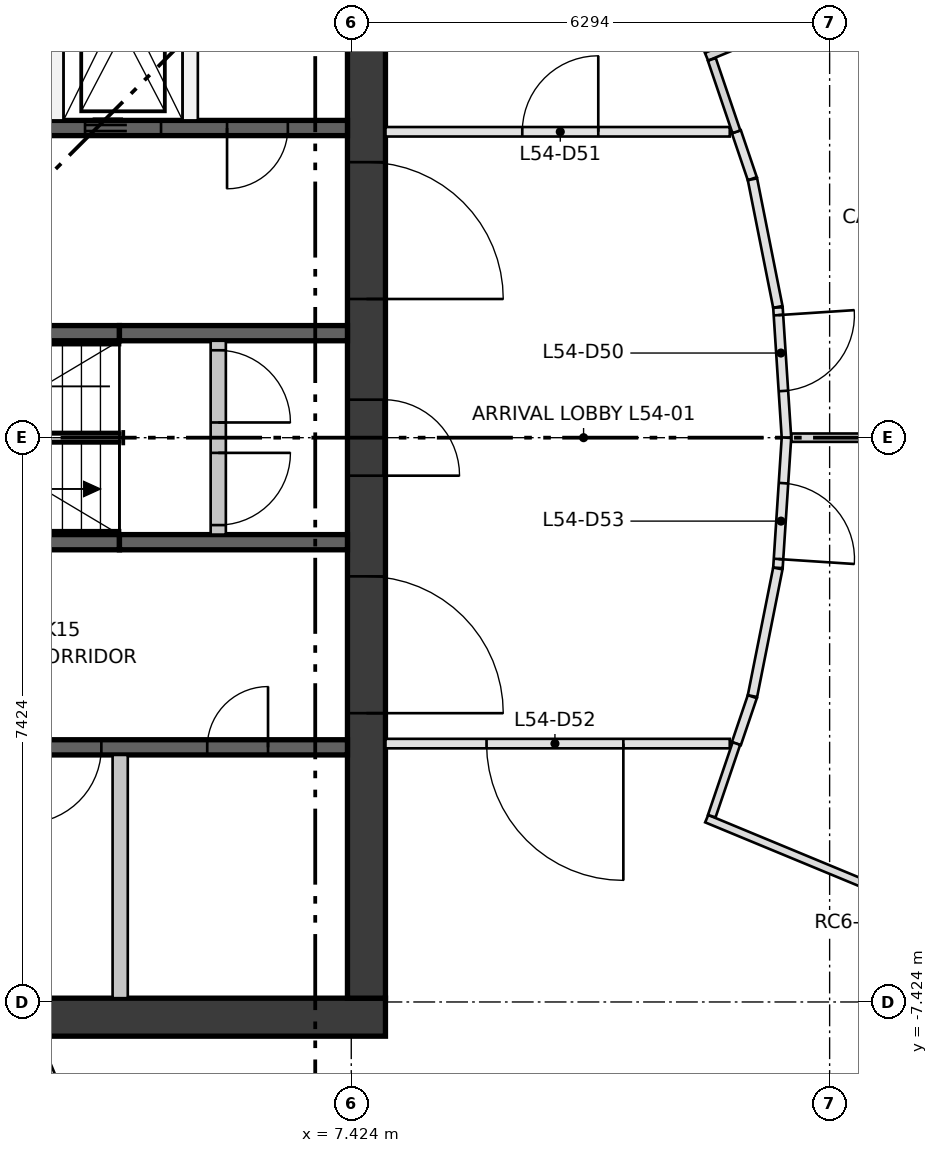
"""IFC4 building model, lengths in metres.
Left out: names, types, materials, properties, quantities, classifications, styles, units other than length and angle.
Written with IfcOpenShell. Run it as: python <this file> out.ifc"""

import sys

from ifc_helpers import new_model, si_unit, direction, frame, frame_2d, origin, place, context, subcontext, project, spatial, rectangle, extrude, element, fill, save


model = new_model("IFC4")
c1 = context("Model", 3, precision=1e-05, world=origin(), true_north=direction((0.0, 1.0)))
c2 = subcontext(c1, "Body", "Model", "MODEL_VIEW")
j1 = project(units=[si_unit("LENGTHUNIT", "METRE"), si_unit("PLANEANGLEUNIT", "RADIAN")], contexts=[c1])
p1 = place(None, origin())
s1 = spatial("IfcSite", under=j1, at=p1, CompositionType="ELEMENT")
p2 = place(p1, origin())
s2 = spatial("IfcBuilding", under=s1, at=p2, CompositionType="ELEMENT")
p3 = place(p2, frame((0.0, 0.0, 201.05)))
s3 = spatial("IfcBuildingStorey", under=s2, at=p3, CompositionType="ELEMENT", Elevation=201.05)
p4 = place(p3, frame((-7.874, -7.624, 0.0), z_axis=(0.0, 0.0, 1.0), x_axis=(1.0, 0.0, 0.0)))
e1 = element("IfcWall", 1, at=p4, inside=s3, PredefinedType="SHEAR", context=c2, shape_type="SweptSolid", body=[
    extrude(rectangle(XDim=15.748, YDim=0.5, at=frame_2d((7.874, 0.0))), origin(), (0.0, 0.0, 1.0), 3.35),
])
p5 = place(p3, frame((7.624, -7.374, 0.0), z_axis=(0.0, 0.0, 1.0), x_axis=(0.0, 1.0, 0.0)))
e2 = element("IfcWall", 2, at=p5, inside=s3, PredefinedType="SHEAR", context=c2, shape_type="SweptSolid", body=[
    extrude(rectangle(XDim=14.748, YDim=0.5, at=frame_2d((7.374, 0.0))), origin(), (0.0, 0.0, 1.0), 3.35),
])
p6 = place(p5, frame((6.874, 0.0, 0.0)))
e3 = element("IfcOpeningElement", 3, at=p6, cuts=e2, PredefinedType="OPENING", context=c2, shape_type="SweptSolid", body=[
    extrude(rectangle(XDim=1.0, YDim=2.1, at=frame_2d((0.5, 1.05))), frame((0.0, 0.26, 0.0), z_axis=(0.0, -1.0, 0.0), x_axis=(1.0, 0.0, 0.0)), (0.0, 0.0, 1.0), 0.52),
])
p7 = place(p5, frame((3.75, 0.0, 0.0)))
e4 = element("IfcOpeningElement", 4, at=p7, cuts=e2, PredefinedType="OPENING", context=c2, shape_type="SweptSolid", body=[
    extrude(rectangle(XDim=1.8, YDim=2.1, at=frame_2d((0.9, 1.05))), frame((0.0, 0.26, 0.0), z_axis=(0.0, -1.0, 0.0), x_axis=(1.0, 0.0, 0.0)), (0.0, 0.0, 1.0), 0.52),
])
p8 = place(p5, frame((9.198, 0.0, 0.0)))
e5 = element("IfcOpeningElement", 5, at=p8, cuts=e2, PredefinedType="OPENING", context=c2, shape_type="SweptSolid", body=[
    extrude(rectangle(XDim=1.8, YDim=2.1, at=frame_2d((0.9, 1.05))), frame((0.0, 0.26, 0.0), z_axis=(0.0, -1.0, 0.0), x_axis=(1.0, 0.0, 0.0)), (0.0, 0.0, 1.0), 0.52),
])
p9 = place(p3, frame((-7.374, -4.074, 0.0), z_axis=(0.0, 0.0, 1.0), x_axis=(1.0, 0.0, 0.0)))
e6 = element("IfcWall", 6, at=p9, inside=s3, PredefinedType="SHEAR", context=c2, shape_type="SweptSolid", body=[
    extrude(rectangle(XDim=14.748, YDim=0.2, at=frame_2d((7.374, 0.0))), origin(), (0.0, 0.0, 1.0), 3.0),
])
p10 = place(p9, frame((1.319, 0.0, 0.0)))
e7 = element("IfcOpeningElement", 7, at=p10, cuts=e6, PredefinedType="OPENING", context=c2, shape_type="SweptSolid", body=[
    extrude(rectangle(XDim=1.1, YDim=2.1, at=frame_2d((0.55, 1.05))), frame((0.0, 0.11, 0.0), z_axis=(0.0, -1.0, 0.0), x_axis=(1.0, 0.0, 0.0)), (0.0, 0.0, 1.0), 0.22),
])
p11 = place(p9, frame((4.456, 0.0, 0.0)))
e8 = element("IfcOpeningElement", 8, at=p11, cuts=e6, PredefinedType="OPENING", context=c2, shape_type="SweptSolid", body=[
    extrude(rectangle(XDim=1.1, YDim=2.1, at=frame_2d((0.55, 1.05))), frame((0.0, 0.11, 0.0), z_axis=(0.0, -1.0, 0.0), x_axis=(1.0, 0.0, 0.0)), (0.0, 0.0, 1.0), 0.22),
])
p12 = place(p9, frame((7.918, 0.0, 0.0)))
e9 = element("IfcOpeningElement", 9, at=p12, cuts=e6, PredefinedType="OPENING", context=c2, shape_type="SweptSolid", body=[
    extrude(rectangle(XDim=1.0, YDim=2.1, at=frame_2d((0.5, 1.05))), frame((0.0, 0.11, 0.0), z_axis=(0.0, -1.0, 0.0), x_axis=(1.0, 0.0, 0.0)), (0.0, 0.0, 1.0), 0.22),
])
p13 = place(p9, frame((10.51, 0.0, 0.0)))
e10 = element("IfcOpeningElement", 10, at=p13, cuts=e6, PredefinedType="OPENING", context=c2, shape_type="SweptSolid", body=[
    extrude(rectangle(XDim=1.0, YDim=2.1, at=frame_2d((0.5, 1.05))), frame((0.0, 0.11, 0.0), z_axis=(0.0, -1.0, 0.0), x_axis=(1.0, 0.0, 0.0)), (0.0, 0.0, 1.0), 0.22),
])
p14 = place(p9, frame((12.903, 0.0, 0.0)))
e11 = element("IfcOpeningElement", 11, at=p14, cuts=e6, PredefinedType="OPENING", context=c2, shape_type="SweptSolid", body=[
    extrude(rectangle(XDim=0.8, YDim=2.1, at=frame_2d((0.4, 1.05))), frame((0.0, 0.11, 0.0), z_axis=(0.0, -1.0, 0.0), x_axis=(1.0, 0.0, 0.0)), (0.0, 0.0, 1.0), 0.22),
])
p15 = place(p3, frame((0.0, 4.074, 0.0), z_axis=(0.0, 0.0, 1.0), x_axis=(1.0, 0.0, 0.0)))
e12 = element("IfcWall", 12, at=p15, inside=s3, PredefinedType="SHEAR", context=c2, shape_type="SweptSolid", body=[
    extrude(rectangle(XDim=7.374, YDim=0.2, at=frame_2d((3.687, 0.0))), origin(), (0.0, 0.0, 1.0), 3.0),
])
p16 = place(p15, frame((0.384, 0.0, 0.0)))
e13 = element("IfcOpeningElement", 13, at=p16, cuts=e12, PredefinedType="OPENING", context=c2, shape_type="SweptSolid", body=[
    extrude(rectangle(XDim=1.0, YDim=2.1, at=frame_2d((0.5, 1.05))), frame((0.0, 0.11, 0.0), z_axis=(0.0, -1.0, 0.0), x_axis=(1.0, 0.0, 0.0)), (0.0, 0.0, 1.0), 0.22),
])
p17 = place(p15, frame((2.153, 0.0, 0.0)))
e14 = element("IfcOpeningElement", 14, at=p17, cuts=e12, PredefinedType="OPENING", context=c2, shape_type="SweptSolid", body=[
    extrude(rectangle(XDim=1.0, YDim=2.1, at=frame_2d((0.5, 1.05))), frame((0.0, 0.11, 0.0), z_axis=(0.0, -1.0, 0.0), x_axis=(1.0, 0.0, 0.0)), (0.0, 0.0, 1.0), 0.22),
])
p18 = place(p15, frame((3.921, 0.0, 0.0)))
e15 = element("IfcOpeningElement", 15, at=p18, cuts=e12, PredefinedType="OPENING", context=c2, shape_type="SweptSolid", body=[
    extrude(rectangle(XDim=1.0, YDim=2.1, at=frame_2d((0.5, 1.05))), frame((0.0, 0.11, 0.0), z_axis=(0.0, -1.0, 0.0), x_axis=(1.0, 0.0, 0.0)), (0.0, 0.0, 1.0), 0.22),
])
p19 = place(p15, frame((5.79, 0.0, 0.0)))
e16 = element("IfcOpeningElement", 16, at=p19, cuts=e12, PredefinedType="OPENING", context=c2, shape_type="SweptSolid", body=[
    extrude(rectangle(XDim=0.8, YDim=2.1, at=frame_2d((0.4, 1.05))), frame((0.0, 0.11, 0.0), z_axis=(0.0, -1.0, 0.0), x_axis=(1.0, 0.0, 0.0)), (0.0, 0.0, 1.0), 0.22),
])
p20 = place(p3, frame((0.0, -1.375, 0.0), z_axis=(0.0, 0.0, 1.0), x_axis=(1.0, 0.0, 0.0)))
e17 = element("IfcWall", 17, at=p20, inside=s3, PredefinedType="SHEAR", context=c2, shape_type="SweptSolid", body=[
    extrude(rectangle(XDim=4.374, YDim=0.2, at=frame_2d((2.187, 0.0))), origin(), (0.0, 0.0, 1.0), 3.0),
])
p21 = place(p3, frame((4.374, -1.375, 0.0), z_axis=(0.0, 0.0, 1.0), x_axis=(1.0, 0.0, 0.0)))
e18 = element("IfcWall", 18, at=p21, inside=s3, PredefinedType="SHEAR", context=c2, shape_type="SweptSolid", body=[
    extrude(rectangle(XDim=3.0, YDim=0.2, at=frame_2d((1.5, 0.0))), origin(), (0.0, 0.0, 1.0), 3.0),
])
p22 = place(p3, frame((0.0, 1.375, 0.0), z_axis=(0.0, 0.0, 1.0), x_axis=(1.0, 0.0, 0.0)))
e19 = element("IfcWall", 19, at=p22, inside=s3, PredefinedType="SHEAR", context=c2, shape_type="SweptSolid", body=[
    extrude(rectangle(XDim=4.374, YDim=0.2, at=frame_2d((2.187, 0.0))), origin(), (0.0, 0.0, 1.0), 3.0),
])
p23 = place(p3, frame((4.374, 1.375, 0.0), z_axis=(0.0, 0.0, 1.0), x_axis=(1.0, 0.0, 0.0)))
e20 = element("IfcWall", 20, at=p23, inside=s3, PredefinedType="SHEAR", context=c2, shape_type="SweptSolid", body=[
    extrude(rectangle(XDim=3.0, YDim=0.2, at=frame_2d((1.5, 0.0))), origin(), (0.0, 0.0, 1.0), 3.0),
])
for number, where, z_axis, x_axis in (
    (21, (4.384, -7.374, 0.0), (0.0, 0.0, 1.0), (0.0, 1.0, 0.0)),
    (22, (3.537, 4.174, 0.0), (0.0, 0.0, 1.0), (0.0, 1.0, 0.0)),
    (23, (5.305, 4.174, 0.0), (0.0, 0.0, 1.0), (0.0, 1.0, 0.0)),
):
    element("IfcWall", number, at=place(p3, frame(where, z_axis=z_axis, x_axis=x_axis)), inside=s3, PredefinedType="PARTITIONING", context=c2, shape_type="SweptSolid", body=[
        extrude(rectangle(XDim=3.2, YDim=0.2, at=frame_2d((1.6, 0.0))), origin(), (0.0, 0.0, 1.0), 3.0),
    ])
p24 = place(p3, frame((5.674, -1.275, 0.0), z_axis=(0.0, 0.0, 1.0), x_axis=(0.0, 1.0, 0.0)))
e24 = element("IfcWall", 24, at=p24, inside=s3, PredefinedType="PARTITIONING", context=c2, shape_type="SweptSolid", body=[
    extrude(rectangle(XDim=2.55, YDim=0.2, at=frame_2d((1.275, 0.0))), origin(), (0.0, 0.0, 1.0), 3.0),
])
p25 = place(p24, frame((0.125, 0.0, 0.0)))
e25 = element("IfcOpeningElement", 25, at=p25, cuts=e24, PredefinedType="OPENING", context=c2, shape_type="SweptSolid", body=[
    extrude(rectangle(XDim=0.95, YDim=2.1, at=frame_2d((0.475, 1.05))), frame((0.0, 0.11, 0.0), z_axis=(0.0, -1.0, 0.0), x_axis=(1.0, 0.0, 0.0)), (0.0, 0.0, 1.0), 0.22),
])
p26 = place(p24, frame((1.475, 0.0, 0.0)))
e26 = element("IfcOpeningElement", 26, at=p26, cuts=e24, PredefinedType="OPENING", context=c2, shape_type="SweptSolid", body=[
    extrude(rectangle(XDim=0.95, YDim=2.1, at=frame_2d((0.475, 1.05))), frame((0.0, 0.11, 0.0), z_axis=(0.0, -1.0, 0.0), x_axis=(1.0, 0.0, 0.0)), (0.0, 0.0, 1.0), 0.22),
])
p27 = place(p3, frame((14.142, -9.431, 0.0), z_axis=(0.0, 0.0, 1.0), x_axis=(0.471441594872, 0.881897285756, 0.0)))
e27 = element("IfcWall", 27, at=p27, inside=s3, PredefinedType="SOLIDWALL", context=c2, shape_type="SweptSolid", body=[
    extrude(rectangle(XDim=2.85, YDim=0.3, at=frame_2d((1.425, 0.0))), origin(), (0.0, 0.0, 1.0), 0.9),
])
p28 = place(p3, frame((12.491, 4.024, 0.0), z_axis=(0.0, 0.0, 1.0), x_axis=(0.321506357846, -0.946907419902, 0.0)))
e28 = element("IfcWall", 28, at=p28, inside=s3, PredefinedType="PARTITIONING", context=c2, shape_type="SweptSolid", body=[
    extrude(rectangle(XDim=0.652, YDim=0.125, at=frame_2d((0.326, 0.0))), origin(), (0.0, 0.0, 1.0), 3.0),
])
p29 = place(p3, frame((12.703, 3.399, 0.0), z_axis=(0.0, 0.0, 1.0), x_axis=(0.195101249107, -0.980783106806, 0.0)))
e29 = element("IfcWall", 29, at=p29, inside=s3, PredefinedType="PARTITIONING", context=c2, shape_type="SweptSolid", body=[
    extrude(rectangle(XDim=1.712, YDim=0.125, at=frame_2d((0.856, 0.0))), origin(), (0.0, 0.0, 1.0), 3.0),
])
p30 = place(p3, frame((13.038, 1.712, 0.0), z_axis=(0.0, 0.0, 1.0), x_axis=(0.065300872496, -0.997865620237, 0.0)))
e30 = element("IfcWall", 30, at=p30, inside=s3, PredefinedType="PARTITIONING", context=c2, shape_type="SweptSolid", body=[
    extrude(rectangle(XDim=1.716, YDim=0.125, at=frame_2d((0.858, 0.0))), origin(), (0.0, 0.0, 1.0), 3.0),
])
p31 = place(p30, frame((0.1, 0.0, 0.0)))
e31 = element("IfcOpeningElement", 31, at=p31, cuts=e30, PredefinedType="OPENING", context=c2, shape_type="SweptSolid", body=[
    extrude(rectangle(XDim=1.0, YDim=2.1, at=frame_2d((0.5, 1.05))), frame((0.0, 0.073, 0.0), z_axis=(0.0, -1.0, 0.0), x_axis=(1.0, 0.0, 0.0)), (0.0, 0.0, 1.0), 0.145),
])
p32 = place(p3, frame((7.874, 4.024, 0.0), z_axis=(0.0, 0.0, 1.0), x_axis=(1.0, 0.0, 0.0)))
e32 = element("IfcWall", 32, at=p32, inside=s3, PredefinedType="PARTITIONING", context=c2, shape_type="SweptSolid", body=[
    extrude(rectangle(XDim=4.53, YDim=0.125, at=frame_2d((2.265, 0.0))), origin(), (0.0, 0.0, 1.0), 3.0),
])
p33 = place(p32, frame((1.8, 0.0, 0.0)))
e33 = element("IfcOpeningElement", 33, at=p33, cuts=e32, PredefinedType="OPENING", context=c2, shape_type="SweptSolid", body=[
    extrude(rectangle(XDim=1.0, YDim=2.1, at=frame_2d((0.5, 1.05))), frame((0.0, 0.073, 0.0), z_axis=(0.0, -1.0, 0.0), x_axis=(1.0, 0.0, 0.0)), (0.0, 0.0, 1.0), 0.145),
])
p34 = place(p3, frame((12.404, -4.024, 0.0), z_axis=(0.0, 0.0, 1.0), x_axis=(-1.0, 0.0, 0.0)))
e34 = element("IfcWall", 34, at=p34, inside=s3, PredefinedType="PARTITIONING", context=c2, shape_type="SweptSolid", body=[
    extrude(rectangle(XDim=4.53, YDim=0.125, at=frame_2d((2.265, 0.0))), origin(), (0.0, 0.0, 1.0), 3.0),
])
p35 = place(p34, frame((1.4, 0.0, 0.0)))
e35 = element("IfcOpeningElement", 35, at=p35, cuts=e34, PredefinedType="OPENING", context=c2, shape_type="SweptSolid", body=[
    extrude(rectangle(XDim=1.8, YDim=2.1, at=frame_2d((0.9, 1.05))), frame((0.0, 0.073, 0.0), z_axis=(0.0, -1.0, 0.0), x_axis=(1.0, 0.0, 0.0)), (0.0, 0.0, 1.0), 0.145),
])
p36 = place(p3, frame((12.701, -3.407, 0.0), z_axis=(0.0, 0.0, 1.0), x_axis=(-0.321506357846, -0.946907419902, 0.0)))
e36 = element("IfcWall", 36, at=p36, inside=s3, PredefinedType="PARTITIONING", context=c2, shape_type="SweptSolid", body=[
    extrude(rectangle(XDim=0.652, YDim=0.125, at=frame_2d((0.326, 0.0))), origin(), (0.0, 0.0, 1.0), 3.0),
])
p37 = place(p3, frame((13.037, -1.72, 0.0), z_axis=(0.0, 0.0, 1.0), x_axis=(-0.195101249107, -0.980783106806, 0.0)))
e37 = element("IfcWall", 37, at=p37, inside=s3, PredefinedType="PARTITIONING", context=c2, shape_type="SweptSolid", body=[
    extrude(rectangle(XDim=1.712, YDim=0.125, at=frame_2d((0.856, 0.0))), origin(), (0.0, 0.0, 1.0), 3.0),
])
p38 = place(p3, frame((13.15, 0.0, 0.0), z_axis=(0.0, 0.0, 1.0), x_axis=(-0.065300872496, -0.997865620237, 0.0)))
e38 = element("IfcWall", 38, at=p38, inside=s3, PredefinedType="PARTITIONING", context=c2, shape_type="SweptSolid", body=[
    extrude(rectangle(XDim=1.716, YDim=0.125, at=frame_2d((0.858, 0.0))), origin(), (0.0, 0.0, 1.0), 3.0),
])
p39 = place(p38, frame((0.6, 0.0, 0.0)))
e39 = element("IfcOpeningElement", 39, at=p39, cuts=e38, PredefinedType="OPENING", context=c2, shape_type="SweptSolid", body=[
    extrude(rectangle(XDim=1.0, YDim=2.1, at=frame_2d((0.5, 1.05))), frame((0.0, 0.073, 0.0), z_axis=(0.0, -1.0, 0.0), x_axis=(1.0, 0.0, 0.0)), (0.0, 0.0, 1.0), 0.145),
])
p40 = place(p3, frame((12.098, 5.011, 0.0), z_axis=(0.0, 0.0, 1.0), x_axis=(0.923893054844, 0.382650784934, 0.0)))
e40 = element("IfcWall", 40, at=p40, inside=s3, PredefinedType="PARTITIONING", context=c2, shape_type="SweptSolid", body=[
    extrude(rectangle(XDim=3.125, YDim=0.11, at=frame_2d((1.562, 0.0))), origin(), (0.0, 0.0, 1.0), 3.0),
])
p41 = place(p3, frame((12.491, 4.024, 0.0), z_axis=(0.0, 0.0, 1.0), x_axis=(-0.321393524097, 0.94694572319, 0.0)))
e41 = element("IfcWall", 41, at=p41, inside=s3, PredefinedType="PARTITIONING", context=c2, shape_type="SweptSolid", body=[
    extrude(rectangle(XDim=1.006, YDim=0.11, at=frame_2d((0.503, 0.0))), origin(), (0.0, 0.0, 1.0), 3.0),
])
p42 = place(p3, frame((16.22, 0.0, 0.0), z_axis=(0.0, 0.0, 1.0), x_axis=(-1.0, 0.0, 0.0)))
e42 = element("IfcWall", 42, at=p42, inside=s3, PredefinedType="PARTITIONING", context=c2, shape_type="SweptSolid", body=[
    extrude(rectangle(XDim=3.004, YDim=0.11, at=frame_2d((1.502, 0.0))), origin(), (0.0, 0.0, 1.0), 3.0),
])
p43 = place(p3, frame((4.956, -11.964, 0.0), z_axis=(0.0, 0.0, 1.0), x_axis=(-0.38271544888, 0.923866270186, 0.0)))
e43 = element("IfcWall", 43, at=p43, inside=s3, PredefinedType="PARTITIONING", context=c2, shape_type="SweptSolid", body=[
    extrude(rectangle(XDim=4.427, YDim=0.105, at=frame_2d((2.214, 0.0))), origin(), (0.0, 0.0, 1.0), 3.0),
])
p44 = place(p43, frame((1.7, 0.0, 0.0)))
e44 = element("IfcOpeningElement", 44, at=p44, cuts=e43, PredefinedType="OPENING", context=c2, shape_type="SweptSolid", body=[
    extrude(rectangle(XDim=1.0, YDim=2.1, at=frame_2d((0.5, 1.05))), frame((0.0, 0.062, 0.0), z_axis=(0.0, -1.0, 0.0), x_axis=(1.0, 0.0, 0.0)), (0.0, 0.0, 1.0), 0.125),
])
p45 = place(p3, frame((12.101, -5.012, 0.0), z_axis=(0.0, 0.0, 1.0), x_axis=(0.923889137288, -0.382660243559, 0.0)))
e45 = element("IfcWall", 45, at=p45, inside=s3, PredefinedType="PARTITIONING", context=c2, shape_type="SweptSolid", body=[
    extrude(rectangle(XDim=3.122, YDim=0.105, at=frame_2d((1.561, 0.0))), origin(), (0.0, 0.0, 1.0), 3.0),
])
p46 = place(p3, frame((12.491, -4.024, 0.0), z_axis=(0.0, 0.0, 1.0), x_axis=(-0.321525085424, -0.946901061064, 0.0)))
e46 = element("IfcWall", 46, at=p46, inside=s3, PredefinedType="PARTITIONING", context=c2, shape_type="SweptSolid", body=[
    extrude(rectangle(XDim=1.008, YDim=0.105, at=frame_2d((0.504, 0.0))), origin(), (0.0, 0.0, 1.0), 3.0),
])
p47 = place(p18, frame((1.0, 0.0, 0.0), z_axis=(0.0, 0.0, 1.0), x_axis=(-1.0, 0.0, 0.0)))
e47 = element("IfcDoor", 47, at=p47, inside=s3, OperationType="DOUBLE_DOOR_SLIDING", PredefinedType="DOOR", context=c2, shape_type="SweptSolid", body=[
    extrude(rectangle(XDim=1.0, YDim=2.1, at=frame_2d((0.5, 1.05))), frame((0.0, 0.025, 0.0), z_axis=(0.0, -1.0, 0.0), x_axis=(1.0, 0.0, 0.0)), (0.0, 0.0, 1.0), 0.05),
])
fill(e15, e47)
p48 = place(p25, frame((0.95, 0.0, 0.0), z_axis=(0.0, 0.0, 1.0), x_axis=(-1.0, 0.0, 0.0)))
e48 = element("IfcDoor", 48, at=p48, inside=s3, OperationType="SINGLE_SWING_RIGHT", PredefinedType="DOOR", context=c2, shape_type="SweptSolid", body=[
    extrude(rectangle(XDim=0.95, YDim=2.1, at=frame_2d((0.475, 1.05))), frame((0.0, 0.025, 0.0), z_axis=(0.0, -1.0, 0.0), x_axis=(1.0, 0.0, 0.0)), (0.0, 0.0, 1.0), 0.05),
])
fill(e25, e48)
p49 = place(p26, frame((0.95, 0.0, 0.0), z_axis=(0.0, 0.0, 1.0), x_axis=(-1.0, 0.0, 0.0)))
e49 = element("IfcDoor", 49, at=p49, inside=s3, OperationType="SINGLE_SWING_LEFT", PredefinedType="DOOR", context=c2, shape_type="SweptSolid", body=[
    extrude(rectangle(XDim=0.95, YDim=2.1, at=frame_2d((0.475, 1.05))), frame((0.0, 0.025, 0.0), z_axis=(0.0, -1.0, 0.0), x_axis=(1.0, 0.0, 0.0)), (0.0, 0.0, 1.0), 0.05),
])
fill(e26, e49)
p50 = place(p13, frame((1.0, 0.0, 0.0), z_axis=(0.0, 0.0, 1.0), x_axis=(-1.0, 0.0, 0.0)))
e50 = element("IfcDoor", 50, at=p50, inside=s3, OperationType="SINGLE_SWING_LEFT", PredefinedType="DOOR", context=c2, shape_type="SweptSolid", body=[
    extrude(rectangle(XDim=1.0, YDim=2.1, at=frame_2d((0.5, 1.05))), frame((0.0, 0.025, 0.0), z_axis=(0.0, -1.0, 0.0), x_axis=(1.0, 0.0, 0.0)), (0.0, 0.0, 1.0), 0.05),
])
fill(e10, e50)
p51 = place(p14, origin())
e51 = element("IfcDoor", 51, at=p51, inside=s3, OperationType="SINGLE_SWING_RIGHT", PredefinedType="DOOR", context=c2, shape_type="SweptSolid", body=[
    extrude(rectangle(XDim=0.8, YDim=2.1, at=frame_2d((0.4, 1.05))), frame((0.0, 0.025, 0.0), z_axis=(0.0, -1.0, 0.0), x_axis=(1.0, 0.0, 0.0)), (0.0, 0.0, 1.0), 0.05),
])
fill(e11, e51)
p52 = place(p19, frame((0.8, 0.0, 0.0), z_axis=(0.0, 0.0, 1.0), x_axis=(-1.0, 0.0, 0.0)))
e52 = element("IfcDoor", 52, at=p52, inside=s3, OperationType="SINGLE_SWING_LEFT", PredefinedType="DOOR", context=c2, shape_type="SweptSolid", body=[
    extrude(rectangle(XDim=0.8, YDim=2.1, at=frame_2d((0.4, 1.05))), frame((0.0, 0.025, 0.0), z_axis=(0.0, -1.0, 0.0), x_axis=(1.0, 0.0, 0.0)), (0.0, 0.0, 1.0), 0.05),
])
fill(e16, e52)
p53 = place(p6, frame((1.0, 0.0, 0.0), z_axis=(0.0, 0.0, 1.0), x_axis=(-1.0, 0.0, 0.0)))
e53 = element("IfcDoor", 53, at=p53, inside=s3, OperationType="SINGLE_SWING_LEFT", PredefinedType="DOOR", context=c2, shape_type="SweptSolid", body=[
    extrude(rectangle(XDim=1.0, YDim=2.1, at=frame_2d((0.5, 1.05))), frame((0.0, 0.25, 0.0), z_axis=(0.0, -1.0, 0.0), x_axis=(1.0, 0.0, 0.0)), (0.0, 0.0, 1.0), 0.05),
])
fill(e3, e53)
p54 = place(p7, frame((1.8, 0.0, 0.0), z_axis=(0.0, 0.0, 1.0), x_axis=(-1.0, 0.0, 0.0)))
e54 = element("IfcDoor", 54, at=p54, inside=s3, OperationType="DOUBLE_DOOR_SINGLE_SWING", PredefinedType="DOOR", context=c2, shape_type="SweptSolid", body=[
    extrude(rectangle(XDim=1.8, YDim=2.1, at=frame_2d((0.9, 1.05))), frame((0.0, 0.025, 0.0), z_axis=(0.0, -1.0, 0.0), x_axis=(1.0, 0.0, 0.0)), (0.0, 0.0, 1.0), 0.05),
])
fill(e4, e54)
p55 = place(p8, frame((1.8, 0.0, 0.0), z_axis=(0.0, 0.0, 1.0), x_axis=(-1.0, 0.0, 0.0)))
e55 = element("IfcDoor", 55, at=p55, inside=s3, OperationType="DOUBLE_DOOR_SINGLE_SWING", PredefinedType="DOOR", context=c2, shape_type="SweptSolid", body=[
    extrude(rectangle(XDim=1.8, YDim=2.1, at=frame_2d((0.9, 1.05))), frame((0.0, 0.025, 0.0), z_axis=(0.0, -1.0, 0.0), x_axis=(1.0, 0.0, 0.0)), (0.0, 0.0, 1.0), 0.05),
])
fill(e5, e55)
p56 = place(p31, origin())
e56 = element("IfcDoor", 56, at=p56, inside=s3, OperationType="SINGLE_SWING_LEFT", PredefinedType="DOOR", context=c2, shape_type="SweptSolid", body=[
    extrude(rectangle(XDim=1.0, YDim=2.1, at=frame_2d((0.5, 1.05))), frame((0.0, 0.025, 0.0), z_axis=(0.0, -1.0, 0.0), x_axis=(1.0, 0.0, 0.0)), (0.0, 0.0, 1.0), 0.05),
])
fill(e31, e56)
p57 = place(p33, origin())
e57 = element("IfcDoor", 57, at=p57, inside=s3, OperationType="SINGLE_SWING_RIGHT", PredefinedType="DOOR", context=c2, shape_type="SweptSolid", body=[
    extrude(rectangle(XDim=1.0, YDim=2.1, at=frame_2d((0.5, 1.05))), frame((0.0, 0.025, 0.0), z_axis=(0.0, -1.0, 0.0), x_axis=(1.0, 0.0, 0.0)), (0.0, 0.0, 1.0), 0.05),
])
fill(e33, e57)
p58 = place(p35, origin())
e58 = element("IfcDoor", 58, at=p58, inside=s3, OperationType="DOUBLE_DOOR_SINGLE_SWING", PredefinedType="DOOR", context=c2, shape_type="SweptSolid", body=[
    extrude(rectangle(XDim=1.8, YDim=2.1, at=frame_2d((0.9, 1.05))), frame((0.0, 0.025, 0.0), z_axis=(0.0, -1.0, 0.0), x_axis=(1.0, 0.0, 0.0)), (0.0, 0.0, 1.0), 0.05),
])
fill(e35, e58)
p59 = place(p39, origin())
e59 = element("IfcDoor", 59, at=p59, inside=s3, OperationType="SINGLE_SWING_RIGHT", PredefinedType="DOOR", context=c2, shape_type="SweptSolid", body=[
    extrude(rectangle(XDim=1.0, YDim=2.1, at=frame_2d((0.5, 1.05))), frame((0.0, 0.025, 0.0), z_axis=(0.0, -1.0, 0.0), x_axis=(1.0, 0.0, 0.0)), (0.0, 0.0, 1.0), 0.05),
])
fill(e39, e59)
save(model, sys.argv[1])
